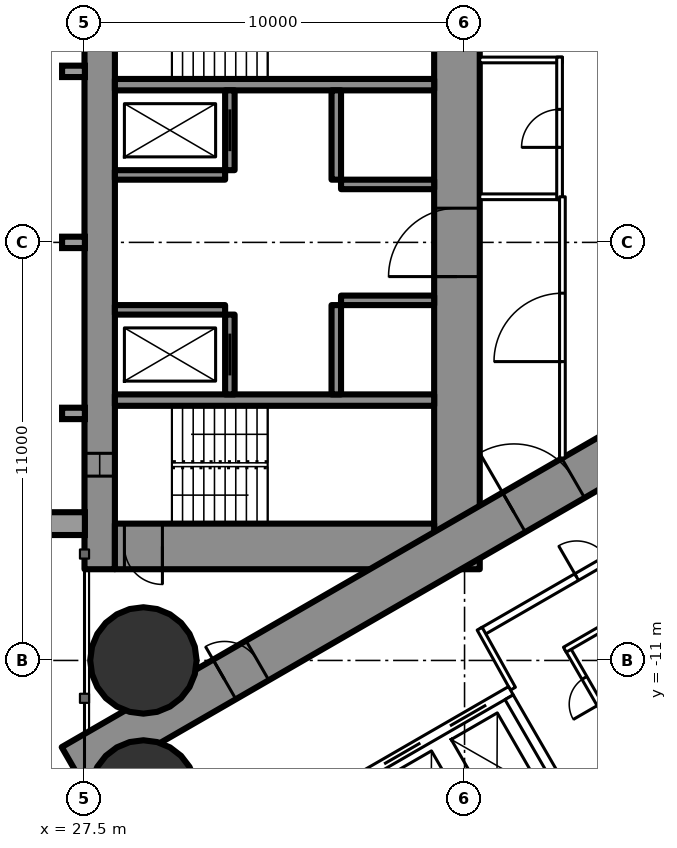
"""IFC4 building model, lengths in metres.
Left out: names, types, materials, properties, quantities, classifications, styles, units other than length and angle.
Written with IfcOpenShell. Run it as: python <this file> out.ifc"""

import sys

from ifc_helpers import new_model, si_unit, direction, frame, frame_2d, origin, origin_2d, place, context, subcontext, project, spatial, rectangle, hollow_circle, extrude, element, fill, save


model = new_model("IFC4")
c1 = context("Model", 3, precision=1e-05, world=origin(), true_north=direction((0.0, 1.0)))
c2 = subcontext(c1, "Body", "Model", "MODEL_VIEW")
j1 = project(units=[si_unit("LENGTHUNIT", "METRE"), si_unit("PLANEANGLEUNIT", "RADIAN")], contexts=[c1])
p1 = place(None, origin())
s1 = spatial("IfcSite", under=j1, at=p1, CompositionType="ELEMENT")
p2 = place(p1, origin())
s2 = spatial("IfcBuilding", under=s1, at=p2, CompositionType="ELEMENT")
p3 = place(p2, frame((0.0, 0.0, 63.5)))
s3 = spatial("IfcBuildingStorey", under=s2, at=p3, CompositionType="ELEMENT", Elevation=63.5)
for number, where, z_axis, x_axis in (
    (1, (29.05, -11.0, 0.0), (0.0, 0.0, 1.0), (1.0, 0.0, 0.0)),
    (2, (29.05, -14.5, 0.0), (0.0, 0.0, 1.0), (1.0, 0.0, 0.0)),
):
    element("IfcColumn", number, at=place(p3, frame(where, z_axis=z_axis, x_axis=x_axis)), inside=s3, PredefinedType="COLUMN", context=c2, shape_type="SweptSolid", body=[
        extrude(hollow_circle(Radius=1.4, WallThickness=0.12, at=origin_2d()), origin(), (0.0, 0.0, 1.0), 3.5),
    ])
p4 = place(p3, frame((27.9, -8.6, 0.0), z_axis=(0.0, 0.0, 1.0), x_axis=(0.0, 1.0, 0.0)))
e3 = element("IfcWall", 3, at=p4, inside=s3, PredefinedType="SHEAR", context=c2, shape_type="SweptSolid", body=[
    extrude(rectangle(XDim=17.2, YDim=0.8, at=frame_2d((8.6, 0.0))), origin(), (0.0, 0.0, 1.0), 3.5),
])
p5 = place(p4, frame((2.45, 0.0, 0.6)))
e4 = element("IfcOpeningElement", 4, at=p5, cuts=e3, PredefinedType="OPENING", context=c2, shape_type="SweptSolid", body=[
    extrude(rectangle(XDim=0.6, YDim=2.1, at=frame_2d((0.3, 1.05))), frame((0.0, 0.41, 0.0), z_axis=(0.0, -1.0, 0.0), x_axis=(1.0, 0.0, 0.0)), (0.0, 0.0, 1.0), 0.82),
])
p6 = place(p4, frame((14.15, 0.0, 0.6)))
e5 = element("IfcOpeningElement", 5, at=p6, cuts=e3, PredefinedType="OPENING", context=c2, shape_type="SweptSolid", body=[
    extrude(rectangle(XDim=0.6, YDim=2.1, at=frame_2d((0.3, 1.05))), frame((0.0, 0.41, 0.0), z_axis=(0.0, -1.0, 0.0), x_axis=(1.0, 0.0, 0.0)), (0.0, 0.0, 1.0), 0.82),
])
p7 = place(p3, frame((37.3, -8.6, 0.0), z_axis=(0.0, 0.0, 1.0), x_axis=(0.0, 1.0, 0.0)))
e6 = element("IfcWall", 6, at=p7, inside=s3, PredefinedType="SHEAR", context=c2, shape_type="SweptSolid", body=[
    extrude(rectangle(XDim=17.2, YDim=1.2, at=frame_2d((8.6, 0.0))), origin(), (0.0, 0.0, 1.0), 3.5),
])
p8 = place(p7, frame((7.7, 0.0, 0.0)))
e7 = element("IfcOpeningElement", 7, at=p8, cuts=e6, PredefinedType="OPENING", context=c2, shape_type="SweptSolid", body=[
    extrude(rectangle(XDim=1.8, YDim=2.2, at=frame_2d((0.9, 1.1))), frame((0.0, 0.61, 0.0), z_axis=(0.0, -1.0, 0.0), x_axis=(1.0, 0.0, 0.0)), (0.0, 0.0, 1.0), 1.22),
])
p9 = place(p3, frame((28.3, -8.0, 0.0), z_axis=(0.0, 0.0, 1.0), x_axis=(1.0, 0.0, 0.0)))
e8 = element("IfcWall", 8, at=p9, inside=s3, PredefinedType="SHEAR", context=c2, shape_type="SweptSolid", body=[
    extrude(rectangle(XDim=8.4, YDim=1.2, at=frame_2d((4.2, 0.0))), origin(), (0.0, 0.0, 1.0), 3.5),
])
p10 = place(p9, frame((0.25, 0.0, 0.0)))
e9 = element("IfcOpeningElement", 9, at=p10, cuts=e8, PredefinedType="OPENING", context=c2, shape_type="SweptSolid", body=[
    extrude(rectangle(XDim=1.0, YDim=2.2, at=frame_2d((0.5, 1.1))), frame((0.0, 0.61, 0.0), z_axis=(0.0, -1.0, 0.0), x_axis=(1.0, 0.0, 0.0)), (0.0, 0.0, 1.0), 1.22),
])
for number, where, z_axis, x_axis in (
    (10, (28.3, -4.15, 0.0), (0.0, 0.0, 1.0), (1.0, 0.0, 0.0)),
    (11, (28.3, 4.15, 0.0), (0.0, 0.0, 1.0), (1.0, 0.0, 0.0)),
):
    element("IfcWall", number, at=place(p3, frame(where, z_axis=z_axis, x_axis=x_axis)), inside=s3, PredefinedType="SHEAR", context=c2, shape_type="SweptSolid", body=[
        extrude(rectangle(XDim=8.4, YDim=0.3, at=frame_2d((4.2, 0.0))), origin(), (0.0, 0.0, 1.0), 3.5),
    ])
p11 = place(p3, frame((31.325, -4.0, 0.0), z_axis=(0.0, 0.0, 1.0), x_axis=(0.0, 1.0, 0.0)))
e12 = element("IfcWall", 12, at=p11, inside=s3, PredefinedType="SHEAR", context=c2, shape_type="SweptSolid", body=[
    extrude(rectangle(XDim=2.1, YDim=0.25, at=frame_2d((1.05, 0.0))), origin(), (0.0, 0.0, 1.0), 3.5),
])
p12 = place(p11, frame((0.5, 0.0, 0.0)))
e13 = element("IfcOpeningElement", 13, at=p12, cuts=e12, PredefinedType="OPENING", context=c2, shape_type="SweptSolid", body=[
    extrude(rectangle(XDim=1.1, YDim=2.2, at=frame_2d((0.55, 1.1))), frame((0.0, 0.135, 0.0), z_axis=(0.0, -1.0, 0.0), x_axis=(1.0, 0.0, 0.0)), (0.0, 0.0, 1.0), 0.27),
])
p13 = place(p3, frame((34.125, -4.0, 0.0), z_axis=(0.0, 0.0, 1.0), x_axis=(0.0, 1.0, 0.0)))
e14 = element("IfcWall", 14, at=p13, inside=s3, PredefinedType="SHEAR", context=c2, shape_type="SweptSolid", body=[
    extrude(rectangle(XDim=2.35, YDim=0.25, at=frame_2d((1.175, 0.0))), origin(), (0.0, 0.0, 1.0), 3.5),
])
p14 = place(p3, frame((28.3, -1.775, 0.0), z_axis=(0.0, 0.0, 1.0), x_axis=(1.0, 0.0, 0.0)))
e15 = element("IfcWall", 15, at=p14, inside=s3, PredefinedType="SHEAR", context=c2, shape_type="SweptSolid", body=[
    extrude(rectangle(XDim=2.9, YDim=0.25, at=frame_2d((1.45, 0.0))), origin(), (0.0, 0.0, 1.0), 3.5),
])
p15 = place(p3, frame((34.25, -1.525, 0.0), z_axis=(0.0, 0.0, 1.0), x_axis=(1.0, 0.0, 0.0)))
e16 = element("IfcWall", 16, at=p15, inside=s3, PredefinedType="SHEAR", context=c2, shape_type="SweptSolid", body=[
    extrude(rectangle(XDim=2.45, YDim=0.25, at=frame_2d((1.225, 0.0))), origin(), (0.0, 0.0, 1.0), 3.5),
])
p16 = place(p3, frame((31.325, 1.9, 0.0), z_axis=(0.0, 0.0, 1.0), x_axis=(0.0, 1.0, 0.0)))
e17 = element("IfcWall", 17, at=p16, inside=s3, PredefinedType="SHEAR", context=c2, shape_type="SweptSolid", body=[
    extrude(rectangle(XDim=2.1, YDim=0.25, at=frame_2d((1.05, 0.0))), origin(), (0.0, 0.0, 1.0), 3.5),
])
p17 = place(p16, frame((0.5, 0.0, 0.0)))
e18 = element("IfcOpeningElement", 18, at=p17, cuts=e17, PredefinedType="OPENING", context=c2, shape_type="SweptSolid", body=[
    extrude(rectangle(XDim=1.1, YDim=2.2, at=frame_2d((0.55, 1.1))), frame((0.0, 0.135, 0.0), z_axis=(0.0, -1.0, 0.0), x_axis=(1.0, 0.0, 0.0)), (0.0, 0.0, 1.0), 0.27),
])
p18 = place(p3, frame((34.125, 1.65, 0.0), z_axis=(0.0, 0.0, 1.0), x_axis=(0.0, 1.0, 0.0)))
e19 = element("IfcWall", 19, at=p18, inside=s3, PredefinedType="SHEAR", context=c2, shape_type="SweptSolid", body=[
    extrude(rectangle(XDim=2.35, YDim=0.25, at=frame_2d((1.175, 0.0))), origin(), (0.0, 0.0, 1.0), 3.5),
])
p19 = place(p3, frame((28.3, 1.775, 0.0), z_axis=(0.0, 0.0, 1.0), x_axis=(1.0, 0.0, 0.0)))
e20 = element("IfcWall", 20, at=p19, inside=s3, PredefinedType="SHEAR", context=c2, shape_type="SweptSolid", body=[
    extrude(rectangle(XDim=2.9, YDim=0.25, at=frame_2d((1.45, 0.0))), origin(), (0.0, 0.0, 1.0), 3.5),
])
p20 = place(p3, frame((34.25, 1.525, 0.0), z_axis=(0.0, 0.0, 1.0), x_axis=(1.0, 0.0, 0.0)))
e21 = element("IfcWall", 21, at=p20, inside=s3, PredefinedType="SHEAR", context=c2, shape_type="SweptSolid", body=[
    extrude(rectangle(XDim=2.45, YDim=0.25, at=frame_2d((1.225, 0.0))), origin(), (0.0, 0.0, 1.0), 3.5),
])
p21 = place(p3, frame((27.2, -13.8, 0.0), z_axis=(0.0, 0.0, 1.0), x_axis=(0.866027159892, 0.499996958321, 0.0)))
e22 = element("IfcWall", 22, at=p21, inside=s3, PredefinedType="SHEAR", context=c2, shape_type="SweptSolid", body=[
    extrude(rectangle(XDim=27.947, YDim=1.2, at=frame_2d((13.973, 0.0))), origin(), (0.0, 0.0, 1.0), 3.5),
])
p22 = place(p21, frame((4.6, 0.0, 0.0)))
e23 = element("IfcOpeningElement", 23, at=p22, cuts=e22, PredefinedType="OPENING", context=c2, shape_type="SweptSolid", body=[
    extrude(rectangle(XDim=1.0, YDim=2.2, at=frame_2d((0.5, 1.1))), frame((0.0, 0.61, 0.0), z_axis=(0.0, -1.0, 0.0), x_axis=(1.0, 0.0, 0.0)), (0.0, 0.0, 1.0), 1.22),
])
p23 = place(p21, frame((13.395, 0.0, 0.0)))
e24 = element("IfcOpeningElement", 24, at=p23, cuts=e22, PredefinedType="OPENING", context=c2, shape_type="SweptSolid", body=[
    extrude(rectangle(XDim=1.8, YDim=2.2, at=frame_2d((0.9, 1.1))), frame((0.0, 0.61, 0.0), z_axis=(0.0, -1.0, 0.0), x_axis=(1.0, 0.0, 0.0)), (0.0, 0.0, 1.0), 1.22),
])
p24 = place(p3, frame((27.2, 13.8, 0.0), z_axis=(0.0, 0.0, 1.0), x_axis=(0.866024515034, -0.500001539357, 0.0)))
e25 = element("IfcWall", 25, at=p24, inside=s3, PredefinedType="SHEAR", context=c2, shape_type="SweptSolid", body=[
    extrude(rectangle(XDim=26.907, YDim=1.2, at=frame_2d((13.454, 0.0))), origin(), (0.0, 0.0, 1.0), 3.5),
])
p25 = place(p24, frame((4.6, 0.0, 0.0)))
e26 = element("IfcOpeningElement", 26, at=p25, cuts=e25, PredefinedType="OPENING", context=c2, shape_type="SweptSolid", body=[
    extrude(rectangle(XDim=1.0, YDim=2.2, at=frame_2d((0.5, 1.1))), frame((0.0, 0.61, 0.0), z_axis=(0.0, -1.0, 0.0), x_axis=(1.0, 0.0, 0.0)), (0.0, 0.0, 1.0), 1.22),
])
p26 = place(p24, frame((13.395, 0.0, 0.0)))
e27 = element("IfcOpeningElement", 27, at=p26, cuts=e25, PredefinedType="OPENING", context=c2, shape_type="SweptSolid", body=[
    extrude(rectangle(XDim=1.8, YDim=2.2, at=frame_2d((0.9, 1.1))), frame((0.0, 0.61, 0.0), z_axis=(0.0, -1.0, 0.0), x_axis=(1.0, 0.0, 0.0)), (0.0, 0.0, 1.0), 1.22),
])
p27 = place(p3, frame((37.96, -10.243, 0.0), z_axis=(0.0, 0.0, 1.0), x_axis=(0.866026429433, 0.499998223521, 0.0)))
e28 = element("IfcWall", 28, at=p27, inside=s3, PredefinedType="PARTITIONING", context=c2, shape_type="SweptSolid", body=[
    extrude(rectangle(XDim=20.487, YDim=0.2, at=frame_2d((10.243, 0.0))), origin(), (0.0, 0.0, 1.0), 3.25),
])
p28 = place(p27, frame((6.925, 0.0, 0.0)))
e29 = element("IfcOpeningElement", 29, at=p28, cuts=e28, PredefinedType="OPENING", context=c2, shape_type="SweptSolid", body=[
    extrude(rectangle(XDim=0.95, YDim=2.2, at=frame_2d((0.475, 1.1))), frame((0.0, 0.11, 0.0), z_axis=(0.0, -1.0, 0.0), x_axis=(1.0, 0.0, 0.0)), (0.0, 0.0, 1.0), 0.22),
])
p29 = place(p27, frame((8.912, 0.0, 0.0)))
e30 = element("IfcOpeningElement", 30, at=p29, cuts=e28, PredefinedType="OPENING", context=c2, shape_type="SweptSolid", body=[
    extrude(rectangle(XDim=0.95, YDim=2.2, at=frame_2d((0.475, 1.1))), frame((0.0, 0.11, 0.0), z_axis=(0.0, -1.0, 0.0), x_axis=(1.0, 0.0, 0.0)), (0.0, 0.0, 1.0), 0.22),
])
p30 = place(p27, frame((13.535, 0.0, 0.0)))
e31 = element("IfcOpeningElement", 31, at=p30, cuts=e28, PredefinedType="OPENING", context=c2, shape_type="SweptSolid", body=[
    extrude(rectangle(XDim=0.95, YDim=2.2, at=frame_2d((0.475, 1.1))), frame((0.0, 0.11, 0.0), z_axis=(0.0, -1.0, 0.0), x_axis=(1.0, 0.0, 0.0)), (0.0, 0.0, 1.0), 0.22),
])
p31 = place(p27, frame((17.585, 0.0, 0.0)))
e32 = element("IfcOpeningElement", 32, at=p31, cuts=e28, PredefinedType="OPENING", context=c2, shape_type="SweptSolid", body=[
    extrude(rectangle(XDim=0.95, YDim=2.2, at=frame_2d((0.475, 1.1))), frame((0.0, 0.11, 0.0), z_axis=(0.0, -1.0, 0.0), x_axis=(1.0, 0.0, 0.0)), (0.0, 0.0, 1.0), 0.22),
])
p32 = place(p27, frame((2.875, 0.0, 0.0)))
e33 = element("IfcOpeningElement", 33, at=p32, cuts=e28, PredefinedType="OPENING", context=c2, shape_type="SweptSolid", body=[
    extrude(rectangle(XDim=0.95, YDim=2.2, at=frame_2d((0.475, 1.1))), frame((0.0, 0.11, 0.0), z_axis=(0.0, -1.0, 0.0), x_axis=(1.0, 0.0, 0.0)), (0.0, 0.0, 1.0), 0.22),
])
p33 = place(p3, frame((38.773, -11.742, 0.0), z_axis=(0.0, 0.0, 1.0), x_axis=(-0.485528096672, 0.8742210632, 0.0)))
e34 = element("IfcWall", 34, at=p33, inside=s3, PredefinedType="PARTITIONING", context=c2, shape_type="SweptSolid", body=[
    extrude(rectangle(XDim=1.805, YDim=0.15, at=frame_2d((0.903, 0.0))), origin(), (0.0, 0.0, 1.0), 3.25),
])
p34 = place(p3, frame((40.204, -10.68, 0.0), z_axis=(0.0, 0.0, 1.0), x_axis=(0.500006934395, -0.866021400173, 0.0)))
e35 = element("IfcWall", 35, at=p34, inside=s3, PredefinedType="PARTITIONING", context=c2, shape_type="SweptSolid", body=[
    extrude(rectangle(XDim=2.6, YDim=0.15, at=frame_2d((1.3, 0.0))), origin(), (0.0, 0.0, 1.0), 3.25),
])
p35 = place(p34, frame((0.9, 0.0, 0.0)))
e36 = element("IfcOpeningElement", 36, at=p35, cuts=e35, PredefinedType="OPENING", context=c2, shape_type="SweptSolid", body=[
    extrude(rectangle(XDim=0.8, YDim=2.2, at=frame_2d((0.4, 1.1))), frame((0.0, 0.085, 0.0), z_axis=(0.0, -1.0, 0.0), x_axis=(1.0, 0.0, 0.0)), (0.0, 0.0, 1.0), 0.17),
])
p36 = place(p3, frame((40.139, -10.718, 0.0), z_axis=(0.0, 0.0, 1.0), x_axis=(0.866031185235, 0.4999899861, 0.0)))
e37 = element("IfcWall", 37, at=p36, inside=s3, PredefinedType="PARTITIONING", context=c2, shape_type="SweptSolid", body=[
    extrude(rectangle(XDim=2.475, YDim=0.15, at=frame_2d((1.238, 0.0))), origin(), (0.0, 0.0, 1.0), 3.25),
])
for number, where, z_axis, x_axis in (
    (38, (37.9, 1.2, 0.0), (0.0, 0.0, 1.0), (1.0, 0.0, 0.0)),
    (39, (37.9, 4.8, 0.0), (0.0, 0.0, 1.0), (1.0, 0.0, 0.0)),
):
    element("IfcWall", number, at=place(p3, frame(where, z_axis=z_axis, x_axis=x_axis)), inside=s3, PredefinedType="PARTITIONING", context=c2, shape_type="SweptSolid", body=[
        extrude(rectangle(XDim=2.175, YDim=0.15, at=frame_2d((1.087, 0.0))), origin(), (0.0, 0.0, 1.0), 3.25),
    ])
p37 = place(p3, frame((40.0, 1.125, 0.0), z_axis=(0.0, 0.0, 1.0), x_axis=(0.0, 1.0, 0.0)))
e40 = element("IfcWall", 40, at=p37, inside=s3, PredefinedType="PARTITIONING", context=c2, shape_type="SweptSolid", body=[
    extrude(rectangle(XDim=3.75, YDim=0.15, at=frame_2d((1.875, 0.0))), origin(), (0.0, 0.0, 1.0), 3.25),
])
p38 = place(p37, frame((1.375, 0.0, 0.0)))
e41 = element("IfcOpeningElement", 41, at=p38, cuts=e40, PredefinedType="OPENING", context=c2, shape_type="SweptSolid", body=[
    extrude(rectangle(XDim=1.0, YDim=2.2, at=frame_2d((0.5, 1.1))), frame((0.0, 0.085, 0.0), z_axis=(0.0, -1.0, 0.0), x_axis=(1.0, 0.0, 0.0)), (0.0, 0.0, 1.0), 0.17),
])
p39 = place(p3, frame((40.075, -5.674, 0.0), z_axis=(0.0, 0.0, 1.0), x_axis=(0.0, 1.0, 0.0)))
e42 = element("IfcWall", 42, at=p39, inside=s3, PredefinedType="PARTITIONING", context=c2, shape_type="SweptSolid", body=[
    extrude(rectangle(XDim=6.874, YDim=0.15, at=frame_2d((3.437, 0.0))), origin(), (0.0, 0.0, 1.0), 3.25),
])
p40 = place(p39, frame((2.537, 0.0, 0.0)))
e43 = element("IfcOpeningElement", 43, at=p40, cuts=e42, PredefinedType="OPENING", context=c2, shape_type="SweptSolid", body=[
    extrude(rectangle(XDim=1.8, YDim=2.2, at=frame_2d((0.9, 1.1))), frame((0.0, 0.085, 0.0), z_axis=(0.0, -1.0, 0.0), x_axis=(1.0, 0.0, 0.0)), (0.0, 0.0, 1.0), 0.17),
])
p41 = place(p3, frame((31.271, -16.097, 0.0), z_axis=(0.0, 0.0, 1.0), x_axis=(0.86604045752, 0.499973925258, 0.0)))
e44 = element("IfcWall", 44, at=p41, inside=s3, PredefinedType="PARTITIONING", context=c2, shape_type="SweptSolid", body=[
    extrude(rectangle(XDim=8.6, YDim=0.25, at=frame_2d((4.3, 0.0))), origin(), (0.0, 0.0, 1.0), 3.25),
])
p42 = place(p41, frame((0.75, 0.0, 0.0)))
e45 = element("IfcOpeningElement", 45, at=p42, cuts=e44, PredefinedType="OPENING", context=c2, shape_type="SweptSolid", body=[
    extrude(rectangle(XDim=1.1, YDim=2.2, at=frame_2d((0.55, 1.1))), frame((0.0, 0.135, 0.0), z_axis=(0.0, -1.0, 0.0), x_axis=(1.0, 0.0, 0.0)), (0.0, 0.0, 1.0), 0.27),
])
p43 = place(p41, frame((2.75, 0.0, 0.0)))
e46 = element("IfcOpeningElement", 46, at=p43, cuts=e44, PredefinedType="OPENING", context=c2, shape_type="SweptSolid", body=[
    extrude(rectangle(XDim=1.1, YDim=2.2, at=frame_2d((0.55, 1.1))), frame((0.0, 0.135, 0.0), z_axis=(0.0, -1.0, 0.0), x_axis=(1.0, 0.0, 0.0)), (0.0, 0.0, 1.0), 0.27),
])
p44 = place(p41, frame((4.75, 0.0, 0.0)))
e47 = element("IfcOpeningElement", 47, at=p44, cuts=e44, PredefinedType="OPENING", context=c2, shape_type="SweptSolid", body=[
    extrude(rectangle(XDim=1.1, YDim=2.2, at=frame_2d((0.55, 1.1))), frame((0.0, 0.135, 0.0), z_axis=(0.0, -1.0, 0.0), x_axis=(1.0, 0.0, 0.0)), (0.0, 0.0, 1.0), 0.27),
])
p45 = place(p41, frame((6.75, 0.0, 0.0)))
e48 = element("IfcOpeningElement", 48, at=p45, cuts=e44, PredefinedType="OPENING", context=c2, shape_type="SweptSolid", body=[
    extrude(rectangle(XDim=1.1, YDim=2.2, at=frame_2d((0.55, 1.1))), frame((0.0, 0.135, 0.0), z_axis=(0.0, -1.0, 0.0), x_axis=(1.0, 0.0, 0.0)), (0.0, 0.0, 1.0), 0.27),
])
p46 = place(p3, frame((38.673, -11.968, 0.0), z_axis=(0.0, 0.0, 1.0), x_axis=(0.499929347863, -0.866066190972, 0.0)))
e49 = element("IfcWall", 49, at=p46, inside=s3, PredefinedType="PARTITIONING", context=c2, shape_type="SweptSolid", body=[
    extrude(rectangle(XDim=3.201, YDim=0.25, at=frame_2d((1.6, 0.0))), origin(), (0.0, 0.0, 1.0), 3.25),
])
p47 = place(p35, origin())
e50 = element("IfcDoor", 50, at=p47, inside=s3, OperationType="SINGLE_SWING_RIGHT", PredefinedType="DOOR", context=c2, shape_type="SweptSolid", body=[
    extrude(rectangle(XDim=0.8, YDim=2.2, at=frame_2d((0.4, 1.1))), frame((0.0, 0.025, 0.0), z_axis=(0.0, -1.0, 0.0), x_axis=(1.0, 0.0, 0.0)), (0.0, 0.0, 1.0), 0.05),
])
fill(e36, e50)
p48 = place(p32, origin())
e51 = element("IfcDoor", 51, at=p48, inside=s3, OperationType="SINGLE_SWING_LEFT", PredefinedType="DOOR", context=c2, shape_type="SweptSolid", body=[
    extrude(rectangle(XDim=0.95, YDim=2.2, at=frame_2d((0.475, 1.1))), frame((0.0, 0.025, 0.0), z_axis=(0.0, -1.0, 0.0), x_axis=(1.0, 0.0, 0.0)), (0.0, 0.0, 1.0), 0.05),
])
fill(e33, e51)
p49 = place(p38, origin())
e52 = element("IfcDoor", 52, at=p49, inside=s3, OperationType="SINGLE_SWING_LEFT", PredefinedType="DOOR", context=c2, shape_type="SweptSolid", body=[
    extrude(rectangle(XDim=1.0, YDim=2.2, at=frame_2d((0.5, 1.1))), frame((0.0, 0.025, 0.0), z_axis=(0.0, -1.0, 0.0), x_axis=(1.0, 0.0, 0.0)), (0.0, 0.0, 1.0), 0.05),
])
fill(e41, e52)
p50 = place(p40, origin())
e53 = element("IfcDoor", 53, at=p50, inside=s3, OperationType="DOUBLE_DOOR_SINGLE_SWING", PredefinedType="DOOR", context=c2, shape_type="SweptSolid", body=[
    extrude(rectangle(XDim=1.8, YDim=2.2, at=frame_2d((0.9, 1.1))), frame((0.0, 0.025, 0.0), z_axis=(0.0, -1.0, 0.0), x_axis=(1.0, 0.0, 0.0)), (0.0, 0.0, 1.0), 0.05),
])
fill(e43, e53)
p51 = place(p22, origin())
e54 = element("IfcDoor", 54, at=p51, inside=s3, OperationType="SINGLE_SWING_LEFT", PredefinedType="DOOR", context=c2, shape_type="SweptSolid", body=[
    extrude(rectangle(XDim=1.0, YDim=2.2, at=frame_2d((0.5, 1.1))), frame((0.0, 0.025, 0.0), z_axis=(0.0, -1.0, 0.0), x_axis=(1.0, 0.0, 0.0)), (0.0, 0.0, 1.0), 0.05),
])
fill(e23, e54)
p52 = place(p23, origin())
e55 = element("IfcDoor", 55, at=p52, inside=s3, OperationType="DOUBLE_DOOR_SINGLE_SWING", PredefinedType="DOOR", context=c2, shape_type="SweptSolid", body=[
    extrude(rectangle(XDim=1.8, YDim=2.2, at=frame_2d((0.9, 1.1))), frame((0.0, 0.025, 0.0), z_axis=(0.0, -1.0, 0.0), x_axis=(1.0, 0.0, 0.0)), (0.0, 0.0, 1.0), 0.05),
])
fill(e24, e55)
p53 = place(p8, origin())
e56 = element("IfcDoor", 56, at=p53, inside=s3, OperationType="DOUBLE_DOOR_SINGLE_SWING", PredefinedType="DOOR", context=c2, shape_type="SweptSolid", body=[
    extrude(rectangle(XDim=1.8, YDim=2.2, at=frame_2d((0.9, 1.1))), frame((0.0, 0.025, 0.0), z_axis=(0.0, -1.0, 0.0), x_axis=(1.0, 0.0, 0.0)), (0.0, 0.0, 1.0), 0.05),
])
fill(e7, e56)
p54 = place(p10, origin())
e57 = element("IfcDoor", 57, at=p54, inside=s3, OperationType="SINGLE_SWING_RIGHT", PredefinedType="DOOR", context=c2, shape_type="SweptSolid", body=[
    extrude(rectangle(XDim=1.0, YDim=2.2, at=frame_2d((0.5, 1.1))), frame((0.0, 0.025, 0.0), z_axis=(0.0, -1.0, 0.0), x_axis=(1.0, 0.0, 0.0)), (0.0, 0.0, 1.0), 0.05),
])
fill(e9, e57)
p55 = place(p12, origin())
e58 = element("IfcDoor", 58, at=p55, inside=s3, OperationType="SLIDING_TO_LEFT", PredefinedType="USERDEFINED", context=c2, shape_type="SweptSolid", body=[
    extrude(rectangle(XDim=1.1, YDim=2.2, at=frame_2d((0.55, 1.1))), frame((0.0, 0.025, 0.0), z_axis=(0.0, -1.0, 0.0), x_axis=(1.0, 0.0, 0.0)), (0.0, 0.0, 1.0), 0.05),
])
fill(e13, e58)
p56 = place(p17, origin())
e59 = element("IfcDoor", 59, at=p56, inside=s3, OperationType="SLIDING_TO_LEFT", PredefinedType="USERDEFINED", context=c2, shape_type="SweptSolid", body=[
    extrude(rectangle(XDim=1.1, YDim=2.2, at=frame_2d((0.55, 1.1))), frame((0.0, 0.025, 0.0), z_axis=(0.0, -1.0, 0.0), x_axis=(1.0, 0.0, 0.0)), (0.0, 0.0, 1.0), 0.05),
])
fill(e18, e59)
p57 = place(p44, origin())
e60 = element("IfcDoor", 60, at=p57, inside=s3, OperationType="DOUBLE_DOOR_SLIDING", PredefinedType="USERDEFINED", context=c2, shape_type="SweptSolid", body=[
    extrude(rectangle(XDim=1.1, YDim=2.2, at=frame_2d((0.55, 1.1))), frame((0.0, 0.025, 0.0), z_axis=(0.0, -1.0, 0.0), x_axis=(1.0, 0.0, 0.0)), (0.0, 0.0, 1.0), 0.05),
])
fill(e47, e60)
p58 = place(p45, origin())
e61 = element("IfcDoor", 61, at=p58, inside=s3, OperationType="DOUBLE_DOOR_SLIDING", PredefinedType="USERDEFINED", context=c2, shape_type="SweptSolid", body=[
    extrude(rectangle(XDim=1.1, YDim=2.2, at=frame_2d((0.55, 1.1))), frame((0.0, 0.025, 0.0), z_axis=(0.0, -1.0, 0.0), x_axis=(1.0, 0.0, 0.0)), (0.0, 0.0, 1.0), 0.05),
])
fill(e48, e61)
p59 = place(p5, origin())
e62 = element("IfcWindow", 62, at=p59, inside=s3, PartitioningType="SINGLE_PANEL", PredefinedType="WINDOW", context=c2, shape_type="SweptSolid", body=[
    extrude(rectangle(XDim=0.6, YDim=2.1, at=frame_2d((0.3, 1.05))), frame((0.0, 0.03, 0.0), z_axis=(0.0, -1.0, 0.0), x_axis=(1.0, 0.0, 0.0)), (0.0, 0.0, 1.0), 0.06),
])
fill(e4, e62)
save(model, sys.argv[1])
